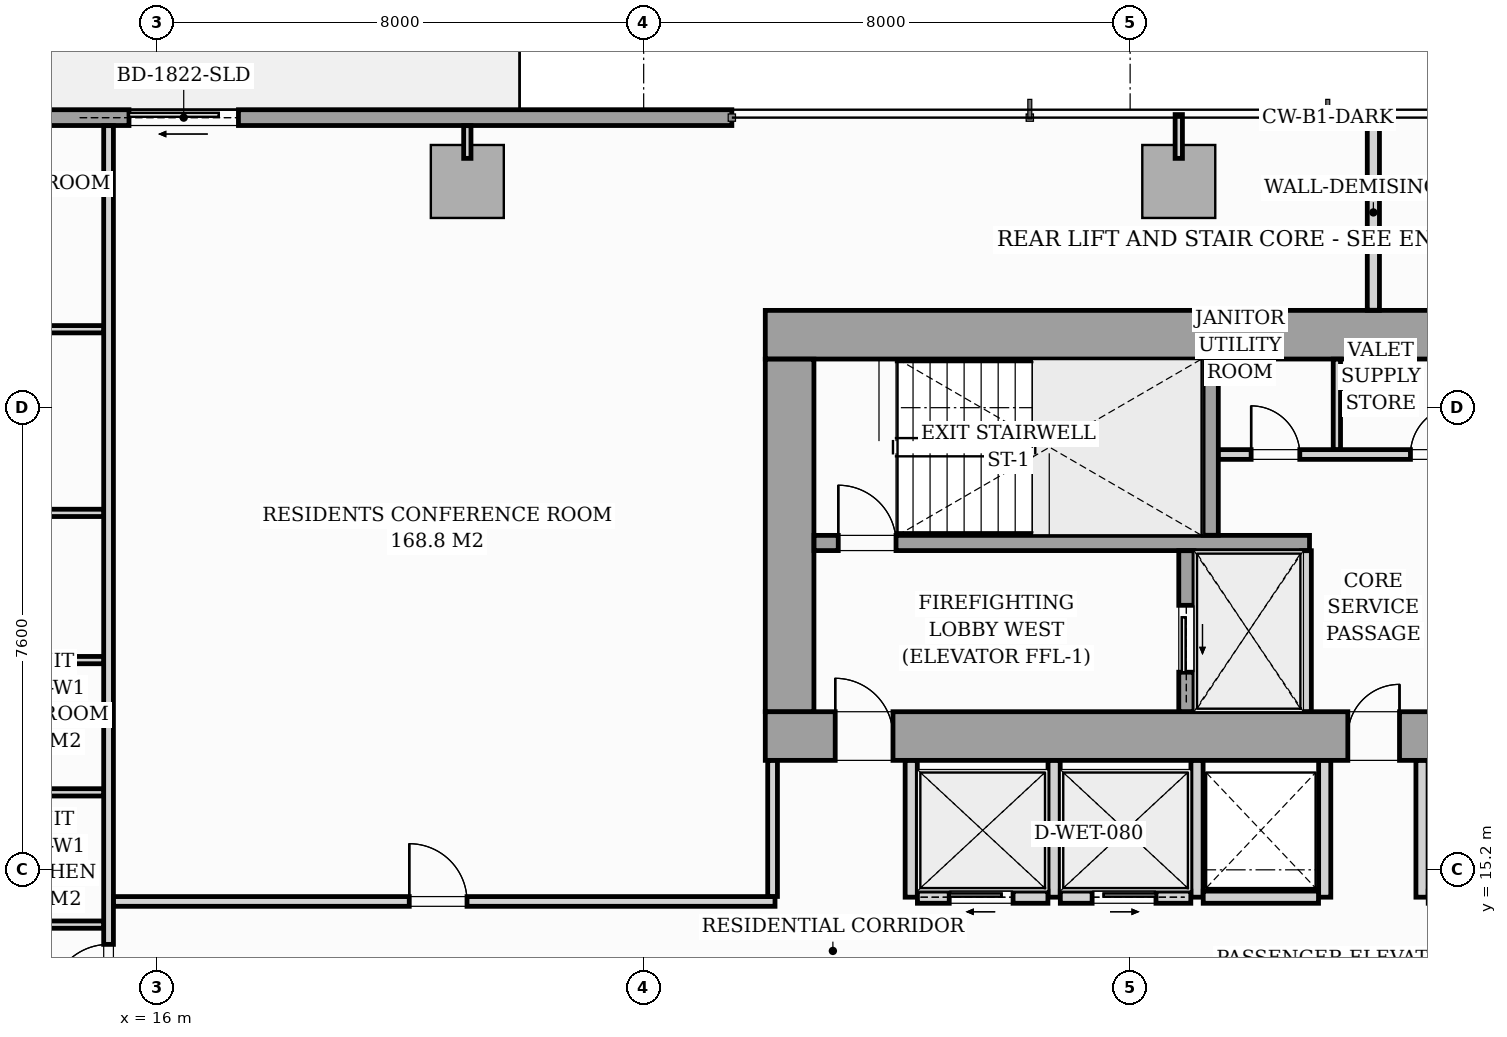
"""IFC4 building model, lengths in metres.
Left out: names, types, materials, properties, quantities, classifications, styles, units other than length and angle.
Written with IfcOpenShell. Run it as: python <this file> out.ifc"""

import sys

from ifc_helpers import new_model, si_unit, direction, frame, frame_2d, origin, origin_2d, place, context, subcontext, project, spatial, rectangle, i_section, extrude, source, transform, mapped, element, fill, save


model = new_model("IFC4")
c1 = context("Model", 3, precision=1e-05, world=origin(), true_north=direction((0.0, 1.0)))
c2 = subcontext(c1, "Body", "Model", "MODEL_VIEW")
j1 = project(units=[si_unit("LENGTHUNIT", "METRE"), si_unit("PLANEANGLEUNIT", "RADIAN")], contexts=[c1])
p1 = place(None, origin())
s1 = spatial("IfcSite", under=j1, at=p1, CompositionType="ELEMENT")
p2 = place(p1, origin())
s2 = spatial("IfcBuilding", under=s1, at=p2, CompositionType="ELEMENT")
p3 = place(p2, frame((0.0, 0.0, 45.4)))
s3 = spatial("IfcBuildingStorey", under=s2, at=p3, CompositionType="ELEMENT", Elevation=45.4)
m1 = source(origin(), c2, "Body", "SweptSolid", [
    extrude(i_section(OverallWidth=0.437, OverallDepth=0.514, WebThickness=0.061, FlangeThickness=0.097, FilletRadius=0.018, at=origin_2d()), origin(), (0.0, 0.0, 1.0), 3.196),
])
for number, where, z_axis, x_axis in (
    (1, (26.4, 17.4, 0.002), (0.0, 0.0, 1.0), (1.0, 0.0, 0.0)),
    (2, (33.12, 17.4, 0.002), (0.0, 0.0, 1.0), (1.0, 0.0, 0.0)),
    (3, (26.4, 24.0, 0.002), (0.0, 0.0, 1.0), (1.0, 0.0, 0.0)),
    (4, (33.12, 24.0, 0.002), (0.0, 0.0, 1.0), (1.0, 0.0, 0.0)),
):
    element("IfcColumn", number, at=place(p3, frame(where, z_axis=z_axis, x_axis=x_axis)), inside=s3, PredefinedType="PILASTER", context=c2, shape_type="MappedRepresentation", body=[
        mapped(m1, transform((0.0, 0.0, 0.0), scale=1.0)),
    ])
m2 = source(origin(), c2, "Body", "SweptSolid", [
    extrude(rectangle(XDim=1.2, YDim=1.2, at=origin_2d()), origin(), (0.0, 0.0, 1.0), 3.196),
])
for number, where, z_axis, x_axis in (
    (5, (21.1, 26.52, 0.002), (0.0, 0.0, 1.0), (1.0, 0.0, 0.0)),
    (6, (32.8, 26.52, 0.002), (0.0, 0.0, 1.0), (1.0, 0.0, 0.0)),
):
    element("IfcColumn", number, at=place(p3, frame(where, z_axis=z_axis, x_axis=x_axis)), inside=s3, PredefinedType="COLUMN", context=c2, shape_type="MappedRepresentation", body=[
        mapped(m2, transform((0.0, 0.0, 0.0), scale=1.0)),
    ])
p4 = place(p3, frame((8.3, 27.57, 0.0), z_axis=(0.0, 0.0, 1.0), x_axis=(1.0, 0.0, 0.0)))
e7 = element("IfcWall", 7, at=p4, inside=s3, PredefinedType="STANDARD", context=c2, shape_type="SweptSolid", body=[
    extrude(rectangle(XDim=17.15, YDim=0.26, at=frame_2d((8.575, 0.0))), origin(), (0.0, 0.0, 1.0), 2.94),
])
p5 = place(p4, frame((7.236, 0.0, 0.0)))
e8 = element("IfcOpeningElement", 8, at=p5, cuts=e7, PredefinedType="OPENING", context=c2, shape_type="SweptSolid", body=[
    extrude(rectangle(XDim=1.8, YDim=2.06, at=frame_2d((0.9, 1.03))), frame((0.0, 0.14, 0.0), z_axis=(0.0, -1.0, 0.0), x_axis=(1.0, 0.0, 0.0)), (0.0, 0.0, 1.0), 0.28),
])
p6 = place(p4, frame((2.05, 0.0, 0.65)))
e9 = element("IfcOpeningElement", 9, at=p6, cuts=e7, PredefinedType="OPENING", context=c2, shape_type="SweptSolid", body=[
    extrude(rectangle(XDim=1.6, YDim=1.5, at=frame_2d((0.8, 0.75))), frame((0.0, 0.14, 0.0), z_axis=(0.0, -1.0, 0.0), x_axis=(1.0, 0.0, 0.0)), (0.0, 0.0, 1.0), 0.28),
])
p7 = place(p3, frame((26.0, 17.4, 0.0), z_axis=(0.0, 0.0, 1.0), x_axis=(1.0, 0.0, 0.0)))
e10 = element("IfcWall", 10, at=p7, inside=s3, PredefinedType="SHEAR", context=c2, shape_type="SweptSolid", body=[
    extrude(rectangle(XDim=20.0, YDim=0.8, at=frame_2d((10.0, 0.0))), origin(), (0.0, 0.0, 1.0), 3.2),
])
p8 = place(p7, frame((1.15, 0.0, 0.0)))
e11 = element("IfcOpeningElement", 11, at=p8, cuts=e10, PredefinedType="OPENING", context=c2, shape_type="SweptSolid", body=[
    extrude(rectangle(XDim=0.95, YDim=2.06, at=frame_2d((0.475, 1.03))), frame((0.0, 0.41, 0.0), z_axis=(0.0, -1.0, 0.0), x_axis=(1.0, 0.0, 0.0)), (0.0, 0.0, 1.0), 0.82),
])
p9 = place(p7, frame((9.58, 0.0, 0.0)))
e12 = element("IfcOpeningElement", 12, at=p9, cuts=e10, PredefinedType="OPENING", context=c2, shape_type="SweptSolid", body=[
    extrude(rectangle(XDim=0.85, YDim=2.0, at=frame_2d((0.425, 1.0))), frame((0.0, 0.41, 0.0), z_axis=(0.0, -1.0, 0.0), x_axis=(1.0, 0.0, 0.0)), (0.0, 0.0, 1.0), 0.82),
])
p10 = place(p7, frame((17.75, 0.0, 0.0)))
e13 = element("IfcOpeningElement", 13, at=p10, cuts=e10, PredefinedType="OPENING", context=c2, shape_type="SweptSolid", body=[
    extrude(rectangle(XDim=0.95, YDim=2.06, at=frame_2d((0.475, 1.03))), frame((0.0, 0.41, 0.0), z_axis=(0.0, -1.0, 0.0), x_axis=(1.0, 0.0, 0.0)), (0.0, 0.0, 1.0), 0.82),
])
p11 = place(p3, frame((26.0, 24.0, 0.0), z_axis=(0.0, 0.0, 1.0), x_axis=(1.0, 0.0, 0.0)))
e14 = element("IfcWall", 14, at=p11, inside=s3, PredefinedType="SHEAR", context=c2, shape_type="SweptSolid", body=[
    extrude(rectangle(XDim=20.0, YDim=0.8, at=frame_2d((10.0, 0.0))), origin(), (0.0, 0.0, 1.0), 3.2),
])
p12 = place(p3, frame((26.4, 17.802, 0.0), z_axis=(0.0, 0.0, 1.0), x_axis=(0.0, 1.0, 0.0)))
e15 = element("IfcWall", 15, at=p12, inside=s3, PredefinedType="SHEAR", context=c2, shape_type="SweptSolid", body=[
    extrude(rectangle(XDim=5.796, YDim=0.8, at=frame_2d((2.898, 0.0))), origin(), (0.0, 0.0, 1.0), 3.2),
])
p13 = place(p3, frame((26.802, 20.575, 0.0), z_axis=(0.0, 0.0, 1.0), x_axis=(1.0, 0.0, 0.0)))
e16 = element("IfcWall", 16, at=p13, inside=s3, PredefinedType="SOLIDWALL", context=c2, shape_type="SweptSolid", body=[
    extrude(rectangle(XDim=8.148, YDim=0.25, at=frame_2d((4.074, 0.0))), origin(), (0.0, 0.0, 1.0), 3.2),
])
p14 = place(p13, frame((0.398, 0.0, 0.0)))
e17 = element("IfcOpeningElement", 17, at=p14, cuts=e16, PredefinedType="OPENING", context=c2, shape_type="SweptSolid", body=[
    extrude(rectangle(XDim=0.95, YDim=2.06, at=frame_2d((0.475, 1.03))), frame((0.0, 0.135, 0.0), z_axis=(0.0, -1.0, 0.0), x_axis=(1.0, 0.0, 0.0)), (0.0, 0.0, 1.0), 0.27),
])
p15 = place(p3, frame((33.325, 20.702, 0.0), z_axis=(0.0, 0.0, 1.0), x_axis=(0.0, 1.0, 0.0)))
e18 = element("IfcWall", 18, at=p15, inside=s3, PredefinedType="SOLIDWALL", context=c2, shape_type="SweptSolid", body=[
    extrude(rectangle(XDim=2.896, YDim=0.25, at=frame_2d((1.448, 0.0))), origin(), (0.0, 0.0, 1.0), 3.2),
])
p16 = place(p3, frame((32.925, 17.802, 0.0), z_axis=(0.0, 0.0, 1.0), x_axis=(0.0, 1.0, 0.0)))
e19 = element("IfcWall", 19, at=p16, inside=s3, PredefinedType="SOLIDWALL", context=c2, shape_type="SweptSolid", body=[
    extrude(rectangle(XDim=2.646, YDim=0.25, at=frame_2d((1.323, 0.0))), origin(), (0.0, 0.0, 1.0), 3.2),
])
p17 = place(p16, frame((0.648, 0.0, 0.0)))
e20 = element("IfcOpeningElement", 20, at=p17, cuts=e19, PredefinedType="OPENING", context=c2, shape_type="SweptSolid", body=[
    extrude(rectangle(XDim=1.1, YDim=2.08, at=frame_2d((0.55, 1.04))), frame((0.0, 0.135, 0.0), z_axis=(0.0, -1.0, 0.0), x_axis=(1.0, 0.0, 0.0)), (0.0, 0.0, 1.0), 0.27),
])
p18 = place(p3, frame((34.9, 17.802, 0.0), z_axis=(0.0, 0.0, 1.0), x_axis=(0.0, 1.0, 0.0)))
e21 = element("IfcWall", 21, at=p18, inside=s3, PredefinedType="PARTITIONING", context=c2, shape_type="SweptSolid", body=[
    extrude(rectangle(XDim=2.646, YDim=0.16, at=frame_2d((1.323, 0.0))), origin(), (0.0, 0.0, 1.0), 2.94),
])
p19 = place(p3, frame((33.452, 22.03, 0.0), z_axis=(0.0, 0.0, 1.0), x_axis=(1.0, 0.0, 0.0)))
e22 = element("IfcWall", 22, at=p19, inside=s3, PredefinedType="PARTITIONING", context=c2, shape_type="SweptSolid", body=[
    extrude(rectangle(XDim=5.096, YDim=0.16, at=frame_2d((2.548, 0.0))), origin(), (0.0, 0.0, 1.0), 2.94),
])
p20 = place(p19, frame((0.538, 0.0, 0.0)))
e23 = element("IfcOpeningElement", 23, at=p20, cuts=e22, PredefinedType="OPENING", context=c2, shape_type="SweptSolid", body=[
    extrude(rectangle(XDim=0.8, YDim=2.05, at=frame_2d((0.4, 1.025))), frame((0.0, 0.09, 0.0), z_axis=(0.0, -1.0, 0.0), x_axis=(1.0, 0.0, 0.0)), (0.0, 0.0, 1.0), 0.18),
])
p21 = place(p19, frame((3.158, 0.0, 0.0)))
e24 = element("IfcOpeningElement", 24, at=p21, cuts=e22, PredefinedType="OPENING", context=c2, shape_type="SweptSolid", body=[
    extrude(rectangle(XDim=0.8, YDim=2.05, at=frame_2d((0.4, 1.025))), frame((0.0, 0.09, 0.0), z_axis=(0.0, -1.0, 0.0), x_axis=(1.0, 0.0, 0.0)), (0.0, 0.0, 1.0), 0.18),
])
p22 = place(p3, frame((35.4, 22.112, 0.0), z_axis=(0.0, 0.0, 1.0), x_axis=(0.0, 1.0, 0.0)))
e25 = element("IfcWall", 25, at=p22, inside=s3, PredefinedType="PARTITIONING", context=c2, shape_type="SweptSolid", body=[
    extrude(rectangle(XDim=1.486, YDim=0.12, at=frame_2d((0.743, 0.0))), origin(), (0.0, 0.0, 1.0), 2.94),
])
for number, where, z_axis, x_axis in (
    (26, (28.4, 14.75, 0.0), (0.0, 0.0, 1.0), (0.0, 1.0, 0.0)),
    (27, (30.75, 14.75, 0.0), (0.0, 0.0, 1.0), (0.0, 1.0, 0.0)),
    (28, (33.1, 14.75, 0.0), (0.0, 0.0, 1.0), (0.0, 1.0, 0.0)),
):
    element("IfcWall", number, at=place(p3, frame(where, z_axis=z_axis, x_axis=x_axis)), inside=s3, PredefinedType="PARTITIONING", context=c2, shape_type="SweptSolid", body=[
        extrude(rectangle(XDim=2.248, YDim=0.2, at=frame_2d((1.124, 0.0))), origin(), (0.0, 0.0, 1.0), 2.94),
    ])
p23 = place(p3, frame((28.502, 14.75, 0.0), z_axis=(0.0, 0.0, 1.0), x_axis=(1.0, 0.0, 0.0)))
e29 = element("IfcWall", 29, at=p23, inside=s3, PredefinedType="PARTITIONING", context=c2, shape_type="SweptSolid", body=[
    extrude(rectangle(XDim=2.146, YDim=0.2, at=frame_2d((1.073, 0.0))), origin(), (0.0, 0.0, 1.0), 2.94),
])
p24 = place(p23, frame((0.523, 0.0, 0.0)))
e30 = element("IfcOpeningElement", 30, at=p24, cuts=e29, PredefinedType="OPENING", context=c2, shape_type="SweptSolid", body=[
    extrude(rectangle(XDim=1.05, YDim=2.08, at=frame_2d((0.525, 1.04))), frame((0.0, 0.11, 0.0), z_axis=(0.0, -1.0, 0.0), x_axis=(1.0, 0.0, 0.0)), (0.0, 0.0, 1.0), 0.22),
])
p25 = place(p3, frame((30.852, 14.75, 0.0), z_axis=(0.0, 0.0, 1.0), x_axis=(1.0, 0.0, 0.0)))
e31 = element("IfcWall", 31, at=p25, inside=s3, PredefinedType="PARTITIONING", context=c2, shape_type="SweptSolid", body=[
    extrude(rectangle(XDim=2.146, YDim=0.2, at=frame_2d((1.073, 0.0))), origin(), (0.0, 0.0, 1.0), 2.94),
])
p26 = place(p25, frame((0.523, 0.0, 0.0)))
e32 = element("IfcOpeningElement", 32, at=p26, cuts=e31, PredefinedType="OPENING", context=c2, shape_type="SweptSolid", body=[
    extrude(rectangle(XDim=1.05, YDim=2.08, at=frame_2d((0.525, 1.04))), frame((0.0, 0.11, 0.0), z_axis=(0.0, -1.0, 0.0), x_axis=(1.0, 0.0, 0.0)), (0.0, 0.0, 1.0), 0.22),
])
p27 = place(p3, frame((35.2, 14.75, 0.0), z_axis=(0.0, 0.0, 1.0), x_axis=(0.0, 1.0, 0.0)))
e33 = element("IfcWall", 33, at=p27, inside=s3, PredefinedType="PARTITIONING", context=c2, shape_type="SweptSolid", body=[
    extrude(rectangle(XDim=2.248, YDim=0.2, at=frame_2d((1.124, 0.0))), origin(), (0.0, 0.0, 1.0), 2.94),
])
p28 = place(p3, frame((33.202, 14.75, 0.0), z_axis=(0.0, 0.0, 1.0), x_axis=(1.0, 0.0, 0.0)))
e34 = element("IfcWall", 34, at=p28, inside=s3, PredefinedType="PARTITIONING", context=c2, shape_type="SweptSolid", body=[
    extrude(rectangle(XDim=1.896, YDim=0.2, at=frame_2d((0.948, 0.0))), origin(), (0.0, 0.0, 1.0), 2.94),
])
p29 = place(p3, frame((36.8, 14.75, 0.0), z_axis=(0.0, 0.0, 1.0), x_axis=(0.0, 1.0, 0.0)))
e35 = element("IfcWall", 35, at=p29, inside=s3, PredefinedType="PARTITIONING", context=c2, shape_type="SweptSolid", body=[
    extrude(rectangle(XDim=2.248, YDim=0.2, at=frame_2d((1.124, 0.0))), origin(), (0.0, 0.0, 1.0), 2.94),
])
p30 = place(p3, frame((15.2, 12.712, 0.0), z_axis=(0.0, 0.0, 1.0), x_axis=(0.0, 1.0, 0.0)))
e36 = element("IfcWall", 36, at=p30, inside=s3, PredefinedType="PARTITIONING", context=c2, shape_type="SweptSolid", body=[
    extrude(rectangle(XDim=14.726, YDim=0.16, at=frame_2d((7.363, 0.0))), origin(), (0.0, 0.0, 1.0), 2.94),
])
p31 = place(p30, frame((0.312, 0.0, 0.0)))
e37 = element("IfcOpeningElement", 37, at=p31, cuts=e36, PredefinedType="OPENING", context=c2, shape_type="SweptSolid", body=[
    extrude(rectangle(XDim=0.95, YDim=2.06, at=frame_2d((0.475, 1.03))), frame((0.0, 0.09, 0.0), z_axis=(0.0, -1.0, 0.0), x_axis=(1.0, 0.0, 0.0)), (0.0, 0.0, 1.0), 0.18),
])
p32 = place(p3, frame((36.0, 24.402, 0.0), z_axis=(0.0, 0.0, 1.0), x_axis=(0.0, 1.0, 0.0)))
e38 = element("IfcWall", 38, at=p32, inside=s3, PredefinedType="PARTITIONING", context=c2, shape_type="SweptSolid", body=[
    extrude(rectangle(XDim=3.218, YDim=0.2, at=frame_2d((1.609, 0.0))), origin(), (0.0, 0.0, 1.0), 2.94),
])
for number, where, z_axis, x_axis in (
    (39, (12.862, 16.474, 0.0), (0.0, 0.0, 1.0), (1.0, 0.0, 0.0)),
    (40, (12.862, 14.299, 0.0), (0.0, 0.0, 1.0), (1.0, 0.0, 0.0)),
    (41, (12.862, 18.649, 0.0), (0.0, 0.0, 1.0), (1.0, 0.0, 0.0)),
):
    element("IfcWall", number, at=place(p3, frame(where, z_axis=z_axis, x_axis=x_axis)), inside=s3, PredefinedType="PARTITIONING", context=c2, shape_type="SweptSolid", body=[
        extrude(rectangle(XDim=2.256, YDim=0.12, at=frame_2d((1.128, 0.0))), origin(), (0.0, 0.0, 1.0), 2.94),
    ])
p33 = place(p3, frame((5.88, 24.09, 0.0), z_axis=(0.0, 0.0, 1.0), x_axis=(1.0, 0.0, 0.0)))
e42 = element("IfcWall", 42, at=p33, inside=s3, PredefinedType="PARTITIONING", context=c2, shape_type="SweptSolid", body=[
    extrude(rectangle(XDim=9.238, YDim=0.12, at=frame_2d((4.619, 0.0))), origin(), (0.0, 0.0, 1.0), 2.94),
])
p34 = place(p33, frame((4.185, 0.0, 0.0)))
e43 = element("IfcOpeningElement", 43, at=p34, cuts=e42, PredefinedType="OPENING", context=c2, shape_type="SweptSolid", body=[
    extrude(rectangle(XDim=0.85, YDim=2.05, at=frame_2d((0.425, 1.025))), frame((0.0, 0.07, 0.0), z_axis=(0.0, -1.0, 0.0), x_axis=(1.0, 0.0, 0.0)), (0.0, 0.0, 1.0), 0.14),
])
p35 = place(p3, frame((5.88, 21.07, 0.0), z_axis=(0.0, 0.0, 1.0), x_axis=(1.0, 0.0, 0.0)))
e44 = element("IfcWall", 44, at=p35, inside=s3, PredefinedType="PARTITIONING", context=c2, shape_type="SweptSolid", body=[
    extrude(rectangle(XDim=9.238, YDim=0.12, at=frame_2d((4.619, 0.0))), origin(), (0.0, 0.0, 1.0), 2.94),
])
p36 = place(p35, frame((4.185, 0.0, 0.0)))
e45 = element("IfcOpeningElement", 45, at=p36, cuts=e44, PredefinedType="OPENING", context=c2, shape_type="SweptSolid", body=[
    extrude(rectangle(XDim=0.85, YDim=2.05, at=frame_2d((0.425, 1.025))), frame((0.0, 0.07, 0.0), z_axis=(0.0, -1.0, 0.0), x_axis=(1.0, 0.0, 0.0)), (0.0, 0.0, 1.0), 0.14),
])
p37 = place(p3, frame((15.282, 14.68, 0.0), z_axis=(0.0, 0.0, 1.0), x_axis=(1.0, 0.0, 0.0)))
e46 = element("IfcWall", 46, at=p37, inside=s3, PredefinedType="PARTITIONING", context=c2, shape_type="SweptSolid", body=[
    extrude(rectangle(XDim=10.878, YDim=0.16, at=frame_2d((5.439, 0.0))), origin(), (0.0, 0.0, 1.0), 2.94),
])
p38 = place(p37, frame((4.863, 0.0, 0.0)))
e47 = element("IfcOpeningElement", 47, at=p38, cuts=e46, PredefinedType="OPENING", context=c2, shape_type="SweptSolid", body=[
    extrude(rectangle(XDim=0.95, YDim=2.06, at=frame_2d((0.475, 1.03))), frame((0.0, 0.09, 0.0), z_axis=(0.0, -1.0, 0.0), x_axis=(1.0, 0.0, 0.0)), (0.0, 0.0, 1.0), 0.18),
])
p39 = place(p3, frame((26.12, 14.762, 0.0), z_axis=(0.0, 0.0, 1.0), x_axis=(0.0, 1.0, 0.0)))
e48 = element("IfcWall", 48, at=p39, inside=s3, PredefinedType="PARTITIONING", context=c2, shape_type="SweptSolid", body=[
    extrude(rectangle(XDim=2.236, YDim=0.16, at=frame_2d((1.118, 0.0))), origin(), (0.0, 0.0, 1.0), 2.94),
])
p40 = place(p3, frame((21.1, 26.9, 0.0), z_axis=(0.0, 0.0, 1.0), x_axis=(0.0, 1.0, 0.0)))
e49 = element("IfcWall", 49, at=p40, inside=s3, PredefinedType="PARTITIONING", context=c2, shape_type="SweptSolid", body=[
    extrude(rectangle(XDim=0.538, YDim=0.12, at=frame_2d((0.269, 0.0))), origin(), (0.0, 0.0, 1.0), 2.94),
])
p41 = place(p3, frame((32.8, 26.9, 0.0), z_axis=(0.0, 0.0, 1.0), x_axis=(0.0, 1.0, 0.0)))
e50 = element("IfcWall", 50, at=p41, inside=s3, PredefinedType="PARTITIONING", context=c2, shape_type="SweptSolid", body=[
    extrude(rectangle(XDim=0.72, YDim=0.12, at=frame_2d((0.36, 0.0))), origin(), (0.0, 0.0, 1.0), 2.94),
])
m3 = source(origin(), c2, "Body", "SweptSolid", [
    extrude(rectangle(XDim=1.8, YDim=2.06, at=frame_2d((0.9, 1.03))), frame((0.0, 0.025, 0.0), z_axis=(0.0, -1.0, 0.0), x_axis=(1.0, 0.0, 0.0)), (0.0, 0.0, 1.0), 0.05),
])
p42 = place(p5, origin())
e51 = element("IfcDoor", 51, at=p42, inside=s3, OperationType="SLIDING_TO_LEFT", PredefinedType="DOOR", context=c2, shape_type="MappedRepresentation", body=[
    mapped(m3, transform((0.0, 0.0, 0.0), scale=1.0)),
])
fill(e8, e51)
m4 = source(origin(), c2, "Body", "SweptSolid", [
    extrude(rectangle(XDim=0.95, YDim=2.06, at=frame_2d((0.475, 1.03))), frame((0.0, 0.025, 0.0), z_axis=(0.0, -1.0, 0.0), x_axis=(1.0, 0.0, 0.0)), (0.0, 0.0, 1.0), 0.05),
])
p43 = place(p8, origin())
e52 = element("IfcDoor", 52, at=p43, inside=s3, OperationType="SINGLE_SWING_LEFT", PredefinedType="DOOR", context=c2, shape_type="MappedRepresentation", body=[
    mapped(m4, transform((0.0, 0.0, 0.0), scale=1.0)),
])
fill(e11, e52)
m5 = source(origin(), c2, "Body", "SweptSolid", [
    extrude(rectangle(XDim=0.85, YDim=2.0, at=frame_2d((0.425, 1.0))), frame((0.0, 0.025, 0.0), z_axis=(0.0, -1.0, 0.0), x_axis=(1.0, 0.0, 0.0)), (0.0, 0.0, 1.0), 0.05),
])
p44 = place(p9, origin())
e53 = element("IfcDoor", 53, at=p44, inside=s3, OperationType="SINGLE_SWING_RIGHT", PredefinedType="DOOR", context=c2, shape_type="MappedRepresentation", body=[
    mapped(m5, transform((0.0, 0.0, 0.0), scale=1.0)),
])
fill(e12, e53)
p45 = place(p14, origin())
e54 = element("IfcDoor", 54, at=p45, inside=s3, OperationType="SINGLE_SWING_LEFT", PredefinedType="DOOR", context=c2, shape_type="MappedRepresentation", body=[
    mapped(m4, transform((0.0, 0.0, 0.0), scale=1.0)),
])
fill(e17, e54)
m6 = source(origin(), c2, "Body", "SweptSolid", [
    extrude(rectangle(XDim=1.1, YDim=2.08, at=frame_2d((0.55, 1.04))), frame((0.0, 0.025, 0.0), z_axis=(0.0, -1.0, 0.0), x_axis=(1.0, 0.0, 0.0)), (0.0, 0.0, 1.0), 0.05),
])
p46 = place(p17, origin())
e55 = element("IfcDoor", 55, at=p46, inside=s3, OperationType="SLIDING_TO_LEFT", PredefinedType="DOOR", context=c2, shape_type="MappedRepresentation", body=[
    mapped(m6, transform((0.0, 0.0, 0.0), scale=1.0)),
])
fill(e20, e55)
m7 = source(origin(), c2, "Body", "SweptSolid", [
    extrude(rectangle(XDim=0.8, YDim=2.05, at=frame_2d((0.4, 1.025))), frame((0.0, 0.025, 0.0), z_axis=(0.0, -1.0, 0.0), x_axis=(1.0, 0.0, 0.0)), (0.0, 0.0, 1.0), 0.05),
])
p47 = place(p20, origin())
e56 = element("IfcDoor", 56, at=p47, inside=s3, OperationType="SINGLE_SWING_LEFT", PredefinedType="DOOR", context=c2, shape_type="MappedRepresentation", body=[
    mapped(m7, transform((0.0, 0.0, 0.0), scale=1.0)),
])
fill(e23, e56)
p48 = place(p21, origin())
e57 = element("IfcDoor", 57, at=p48, inside=s3, OperationType="SINGLE_SWING_RIGHT", PredefinedType="DOOR", context=c2, shape_type="MappedRepresentation", body=[
    mapped(m7, transform((0.0, 0.0, 0.0), scale=1.0)),
])
fill(e24, e57)
m8 = source(origin(), c2, "Body", "SweptSolid", [
    extrude(rectangle(XDim=1.05, YDim=2.08, at=frame_2d((0.525, 1.04))), frame((0.0, 0.025, 0.0), z_axis=(0.0, -1.0, 0.0), x_axis=(1.0, 0.0, 0.0)), (0.0, 0.0, 1.0), 0.05),
])
p49 = place(p24, origin())
e58 = element("IfcDoor", 58, at=p49, inside=s3, OperationType="SLIDING_TO_LEFT", PredefinedType="DOOR", context=c2, shape_type="MappedRepresentation", body=[
    mapped(m8, transform((0.0, 0.0, 0.0), scale=1.0)),
])
fill(e30, e58)
p50 = place(p26, origin())
e59 = element("IfcDoor", 59, at=p50, inside=s3, OperationType="SLIDING_TO_RIGHT", PredefinedType="DOOR", context=c2, shape_type="MappedRepresentation", body=[
    mapped(m8, transform((0.0, 0.0, 0.0), scale=1.0)),
])
fill(e32, e59)
m9 = source(origin(), c2, "Body", "SweptSolid", [
    extrude(rectangle(XDim=0.95, YDim=2.06, at=frame_2d((0.475, 1.03))), frame((0.0, 0.025, 0.0), z_axis=(0.0, -1.0, 0.0), x_axis=(1.0, 0.0, 0.0)), (0.0, 0.0, 1.0), 0.05),
])
p51 = place(p31, origin())
e60 = element("IfcDoor", 60, at=p51, inside=s3, OperationType="SINGLE_SWING_LEFT", PredefinedType="DOOR", context=c2, shape_type="MappedRepresentation", body=[
    mapped(m9, transform((0.0, 0.0, 0.0), scale=1.0)),
])
fill(e37, e60)
p52 = place(p38, origin())
e61 = element("IfcDoor", 61, at=p52, inside=s3, OperationType="SINGLE_SWING_LEFT", PredefinedType="DOOR", context=c2, shape_type="MappedRepresentation", body=[
    mapped(m9, transform((0.0, 0.0, 0.0), scale=1.0)),
])
fill(e47, e61)
save(model, sys.argv[1])
